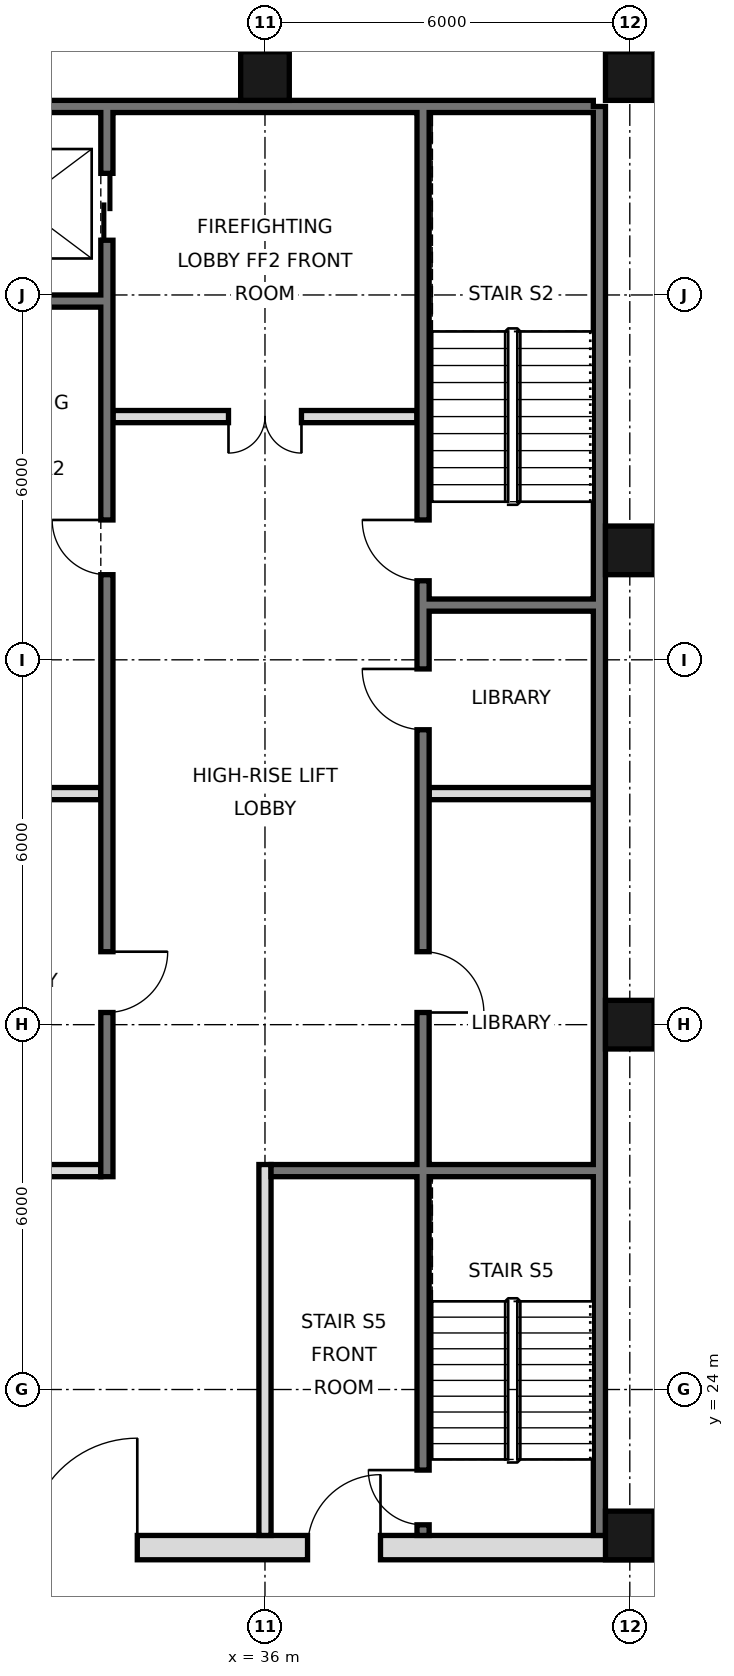
"""IFC4 building model, lengths in metres.
Left out: names, types, materials, properties, quantities, classifications, styles, units other than length and angle.
Written with IfcOpenShell. Run it as: python <this file> out.ifc"""

import sys

from ifc_helpers import new_model, si_unit, direction, frame, frame_2d, origin, origin_2d, place, context, subcontext, project, spatial, rectangle, hollow_rectangle, extrude, element, fill, save


model = new_model("IFC4")
c1 = context("Model", 3, precision=1e-05, world=origin(), true_north=direction((0.0, 1.0)))
c2 = subcontext(c1, "Body", "Model", "MODEL_VIEW")
j1 = project(units=[si_unit("LENGTHUNIT", "METRE"), si_unit("PLANEANGLEUNIT", "RADIAN")], contexts=[c1])
p1 = place(None, origin())
s1 = spatial("IfcSite", under=j1, at=p1, CompositionType="ELEMENT")
p2 = place(p1, origin())
s2 = spatial("IfcBuilding", under=s1, at=p2, CompositionType="ELEMENT")
p3 = place(p2, frame((0.0, 0.0, 151.0)))
s3 = spatial("IfcBuildingStorey", under=s2, at=p3, CompositionType="ELEMENT", Elevation=151.0)
for number, where, z_axis, x_axis in (
    (1, (36.0, 45.6, 0.0), (0.0, 0.0, 1.0), (1.0, 0.0, 0.0)),
    (2, (42.0, 21.6, 0.0), (0.0, 0.0, 1.0), (1.0, 0.0, 0.0)),
    (3, (42.0, 30.0, 0.0), (0.0, 0.0, 1.0), (1.0, 0.0, 0.0)),
    (4, (42.0, 37.8, 0.0), (0.0, 0.0, 1.0), (1.0, 0.0, 0.0)),
    (5, (42.0, 45.6, 0.0), (0.0, 0.0, 1.0), (1.0, 0.0, 0.0)),
):
    element("IfcColumn", number, at=place(p3, frame(where, z_axis=z_axis, x_axis=x_axis)), inside=s3, PredefinedType="COLUMN", context=c2, shape_type="SweptSolid", body=[
        extrude(hollow_rectangle(XDim=0.8, YDim=0.8, WallThickness=0.045, at=origin_2d()), origin(), (0.0, 0.0, 1.0), 3.6),
    ])
p4 = place(p3, frame((41.5, 21.6, 0.0), z_axis=(0.0, 0.0, 1.0), x_axis=(0.0, 1.0, 0.0)))
e6 = element("IfcWall", 6, at=p4, inside=s3, PredefinedType="SOLIDWALL", context=c2, shape_type="SweptSolid", body=[
    extrude(rectangle(XDim=23.5, YDim=0.2, at=frame_2d((11.75, 0.0))), origin(), (0.0, 0.0, 1.0), 3.42),
])
p5 = place(p3, frame((6.6, 45.1, 0.0), z_axis=(0.0, 0.0, 1.0), x_axis=(1.0, 0.0, 0.0)))
e7 = element("IfcWall", 7, at=p5, inside=s3, PredefinedType="SOLIDWALL", context=c2, shape_type="SweptSolid", body=[
    extrude(rectangle(XDim=34.8, YDim=0.2, at=frame_2d((17.4, 0.0))), origin(), (0.0, 0.0, 1.0), 3.42),
])
p6 = place(p3, frame((5.6, 21.4, 0.0), z_axis=(0.0, 0.0, 1.0), x_axis=(1.0, 0.0, 0.0)))
e8 = element("IfcWall", 8, at=p6, inside=s3, PredefinedType="SOLIDWALL", context=c2, shape_type="SweptSolid", body=[
    extrude(rectangle(XDim=36.8, YDim=0.4, at=frame_2d((18.4, 0.0))), origin(), (0.0, 0.0, 1.0), 3.42),
])
p7 = place(p6, frame((8.5, 0.0, 0.0)))
e9 = element("IfcOpeningElement", 9, at=p7, cuts=e8, PredefinedType="OPENING", context=c2, shape_type="SweptSolid", body=[
    extrude(rectangle(XDim=1.8, YDim=2.1, at=frame_2d((0.9, 1.05))), frame((0.0, 0.21, 0.0), z_axis=(0.0, -1.0, 0.0), x_axis=(1.0, 0.0, 0.0)), (0.0, 0.0, 1.0), 0.42),
])
p8 = place(p6, frame((17.5, 0.0, 0.0)))
e10 = element("IfcOpeningElement", 10, at=p8, cuts=e8, PredefinedType="OPENING", context=c2, shape_type="SweptSolid", body=[
    extrude(rectangle(XDim=1.8, YDim=2.1, at=frame_2d((0.9, 1.05))), frame((0.0, 0.21, 0.0), z_axis=(0.0, -1.0, 0.0), x_axis=(1.0, 0.0, 0.0)), (0.0, 0.0, 1.0), 0.42),
])
p9 = place(p6, frame((26.5, 0.0, 0.0)))
e11 = element("IfcOpeningElement", 11, at=p9, cuts=e8, PredefinedType="OPENING", context=c2, shape_type="SweptSolid", body=[
    extrude(rectangle(XDim=1.8, YDim=2.1, at=frame_2d((0.9, 1.05))), frame((0.0, 0.21, 0.0), z_axis=(0.0, -1.0, 0.0), x_axis=(1.0, 0.0, 0.0)), (0.0, 0.0, 1.0), 0.42),
])
p10 = place(p6, frame((4.5, 0.0, 0.0)))
e12 = element("IfcOpeningElement", 12, at=p10, cuts=e8, PredefinedType="OPENING", context=c2, shape_type="SweptSolid", body=[
    extrude(rectangle(XDim=1.2, YDim=2.1, at=frame_2d((0.6, 1.05))), frame((0.0, 0.21, 0.0), z_axis=(0.0, -1.0, 0.0), x_axis=(1.0, 0.0, 0.0)), (0.0, 0.0, 1.0), 0.42),
])
p11 = place(p6, frame((31.1, 0.0, 0.0)))
e13 = element("IfcOpeningElement", 13, at=p11, cuts=e8, PredefinedType="OPENING", context=c2, shape_type="SweptSolid", body=[
    extrude(rectangle(XDim=1.2, YDim=2.1, at=frame_2d((0.6, 1.05))), frame((0.0, 0.21, 0.0), z_axis=(0.0, -1.0, 0.0), x_axis=(1.0, 0.0, 0.0)), (0.0, 0.0, 1.0), 0.42),
])
p12 = place(p3, frame((33.4, 27.5, 0.0), z_axis=(0.0, 0.0, 1.0), x_axis=(0.0, 1.0, 0.0)))
e14 = element("IfcWall", 14, at=p12, inside=s3, PredefinedType="SOLIDWALL", context=c2, shape_type="SweptSolid", body=[
    extrude(rectangle(XDim=17.5, YDim=0.2, at=frame_2d((8.75, 0.0))), origin(), (0.0, 0.0, 1.0), 3.42),
])
p13 = place(p12, frame((15.4, 0.0, 0.0)))
e15 = element("IfcOpeningElement", 15, at=p13, cuts=e14, PredefinedType="OPENING", context=c2, shape_type="SweptSolid", body=[
    extrude(rectangle(XDim=1.1, YDim=2.1, at=frame_2d((0.55, 1.05))), frame((0.0, 0.11, 0.0), z_axis=(0.0, -1.0, 0.0), x_axis=(1.0, 0.0, 0.0)), (0.0, 0.0, 1.0), 0.22),
])
p14 = place(p12, frame((2.7, 0.0, 0.0)))
e16 = element("IfcOpeningElement", 16, at=p14, cuts=e14, PredefinedType="OPENING", context=c2, shape_type="SweptSolid", body=[
    extrude(rectangle(XDim=1.0, YDim=2.1, at=frame_2d((0.5, 1.05))), frame((0.0, 0.11, 0.0), z_axis=(0.0, -1.0, 0.0), x_axis=(1.0, 0.0, 0.0)), (0.0, 0.0, 1.0), 0.22),
])
p15 = place(p12, frame((9.9, 0.0, 0.0)))
e17 = element("IfcOpeningElement", 17, at=p15, cuts=e14, PredefinedType="OPENING", context=c2, shape_type="SweptSolid", body=[
    extrude(rectangle(XDim=0.9, YDim=2.1, at=frame_2d((0.45, 1.05))), frame((0.0, 0.11, 0.0), z_axis=(0.0, -1.0, 0.0), x_axis=(1.0, 0.0, 0.0)), (0.0, 0.0, 1.0), 0.22),
])
p16 = place(p3, frame((36.0, 21.6, 0.0), z_axis=(0.0, 0.0, 1.0), x_axis=(0.0, 1.0, 0.0)))
e18 = element("IfcWall", 18, at=p16, inside=s3, PredefinedType="PARTITIONING", context=c2, shape_type="SweptSolid", body=[
    extrude(rectangle(XDim=6.1, YDim=0.2, at=frame_2d((3.05, 0.0))), origin(), (0.0, 0.0, 1.0), 3.42),
])
p17 = place(p3, frame((38.6, 21.6, 0.0), z_axis=(0.0, 0.0, 1.0), x_axis=(0.0, 1.0, 0.0)))
e19 = element("IfcWall", 19, at=p17, inside=s3, PredefinedType="SOLIDWALL", context=c2, shape_type="SweptSolid", body=[
    extrude(rectangle(XDim=23.4, YDim=0.2, at=frame_2d((11.7, 0.0))), origin(), (0.0, 0.0, 1.0), 3.42),
])
p18 = place(p17, frame((8.6, 0.0, 0.0)))
e20 = element("IfcOpeningElement", 20, at=p18, cuts=e19, PredefinedType="OPENING", context=c2, shape_type="SweptSolid", body=[
    extrude(rectangle(XDim=1.0, YDim=2.1, at=frame_2d((0.5, 1.05))), frame((0.0, 0.11, 0.0), z_axis=(0.0, -1.0, 0.0), x_axis=(1.0, 0.0, 0.0)), (0.0, 0.0, 1.0), 0.22),
])
p19 = place(p17, frame((13.25, 0.0, 0.0)))
e21 = element("IfcOpeningElement", 21, at=p19, cuts=e19, PredefinedType="OPENING", context=c2, shape_type="SweptSolid", body=[
    extrude(rectangle(XDim=1.0, YDim=2.1, at=frame_2d((0.5, 1.05))), frame((0.0, 0.11, 0.0), z_axis=(0.0, -1.0, 0.0), x_axis=(1.0, 0.0, 0.0)), (0.0, 0.0, 1.0), 0.22),
])
p20 = place(p17, frame((15.7, 0.0, 0.0)))
e22 = element("IfcOpeningElement", 22, at=p20, cuts=e19, PredefinedType="OPENING", context=c2, shape_type="SweptSolid", body=[
    extrude(rectangle(XDim=1.0, YDim=2.1, at=frame_2d((0.5, 1.05))), frame((0.0, 0.11, 0.0), z_axis=(0.0, -1.0, 0.0), x_axis=(1.0, 0.0, 0.0)), (0.0, 0.0, 1.0), 0.22),
])
p21 = place(p17, frame((0.175, 0.0, 0.0)))
e23 = element("IfcOpeningElement", 23, at=p21, cuts=e19, PredefinedType="OPENING", context=c2, shape_type="SweptSolid", body=[
    extrude(rectangle(XDim=0.9, YDim=2.1, at=frame_2d((0.45, 1.05))), frame((0.0, 0.11, 0.0), z_axis=(0.0, -1.0, 0.0), x_axis=(1.0, 0.0, 0.0)), (0.0, 0.0, 1.0), 0.22),
])
p22 = place(p3, frame((30.6, 27.6, 0.0), z_axis=(0.0, 0.0, 1.0), x_axis=(1.0, 0.0, 0.0)))
e24 = element("IfcWall", 24, at=p22, inside=s3, PredefinedType="PARTITIONING", context=c2, shape_type="SweptSolid", body=[
    extrude(rectangle(XDim=2.7, YDim=0.2, at=frame_2d((1.35, 0.0))), origin(), (0.0, 0.0, 1.0), 3.42),
])
p23 = place(p3, frame((36.1, 27.6, 0.0), z_axis=(0.0, 0.0, 1.0), x_axis=(1.0, 0.0, 0.0)))
e25 = element("IfcWall", 25, at=p23, inside=s3, PredefinedType="SOLIDWALL", context=c2, shape_type="SweptSolid", body=[
    extrude(rectangle(XDim=5.3, YDim=0.2, at=frame_2d((2.65, 0.0))), origin(), (0.0, 0.0, 1.0), 3.42),
])
p24 = place(p3, frame((30.6, 33.8, 0.0), z_axis=(0.0, 0.0, 1.0), x_axis=(1.0, 0.0, 0.0)))
e26 = element("IfcWall", 26, at=p24, inside=s3, PredefinedType="SOLIDWALL", context=c2, shape_type="SweptSolid", body=[
    extrude(rectangle(XDim=2.7, YDim=0.2, at=frame_2d((1.35, 0.0))), origin(), (0.0, 0.0, 1.0), 3.42),
])
p25 = place(p3, frame((38.7, 33.8, 0.0), z_axis=(0.0, 0.0, 1.0), x_axis=(1.0, 0.0, 0.0)))
e27 = element("IfcWall", 27, at=p25, inside=s3, PredefinedType="PARTITIONING", context=c2, shape_type="SweptSolid", body=[
    extrude(rectangle(XDim=2.7, YDim=0.2, at=frame_2d((1.35, 0.0))), origin(), (0.0, 0.0, 1.0), 3.42),
])
p26 = place(p3, frame((38.7, 36.9, 0.0), z_axis=(0.0, 0.0, 1.0), x_axis=(1.0, 0.0, 0.0)))
e28 = element("IfcWall", 28, at=p26, inside=s3, PredefinedType="SOLIDWALL", context=c2, shape_type="SweptSolid", body=[
    extrude(rectangle(XDim=2.7, YDim=0.2, at=frame_2d((1.35, 0.0))), origin(), (0.0, 0.0, 1.0), 3.42),
])
p27 = place(p3, frame((33.5, 40.0, 0.0), z_axis=(0.0, 0.0, 1.0), x_axis=(1.0, 0.0, 0.0)))
e29 = element("IfcWall", 29, at=p27, inside=s3, PredefinedType="PARTITIONING", context=c2, shape_type="SweptSolid", body=[
    extrude(rectangle(XDim=5.0, YDim=0.2, at=frame_2d((2.5, 0.0))), origin(), (0.0, 0.0, 1.0), 3.42),
])
p28 = place(p27, frame((1.9, 0.0, 0.0)))
e30 = element("IfcOpeningElement", 30, at=p28, cuts=e29, PredefinedType="OPENING", context=c2, shape_type="SweptSolid", body=[
    extrude(rectangle(XDim=1.2, YDim=2.1, at=frame_2d((0.6, 1.05))), frame((0.0, 0.11, 0.0), z_axis=(0.0, -1.0, 0.0), x_axis=(1.0, 0.0, 0.0)), (0.0, 0.0, 1.0), 0.22),
])
p29 = place(p3, frame((30.6, 41.9, 0.0), z_axis=(0.0, 0.0, 1.0), x_axis=(1.0, 0.0, 0.0)))
e31 = element("IfcWall", 31, at=p29, inside=s3, PredefinedType="SOLIDWALL", context=c2, shape_type="SweptSolid", body=[
    extrude(rectangle(XDim=2.7, YDim=0.2, at=frame_2d((1.35, 0.0))), origin(), (0.0, 0.0, 1.0), 3.42),
])
p30 = place(p9, frame((1.8, 0.0, 0.0), z_axis=(0.0, 0.0, 1.0), x_axis=(-1.0, 0.0, 0.0)))
e32 = element("IfcDoor", 32, at=p30, inside=s3, OperationType="SINGLE_SWING_LEFT", PredefinedType="DOOR", context=c2, shape_type="SweptSolid", body=[
    extrude(rectangle(XDim=1.8, YDim=2.1, at=frame_2d((0.9, 1.05))), frame((0.0, 0.025, 0.0), z_axis=(0.0, -1.0, 0.0), x_axis=(1.0, 0.0, 0.0)), (0.0, 0.0, 1.0), 0.05),
])
fill(e11, e32)
p31 = place(p11, frame((1.2, 0.0, 0.0), z_axis=(0.0, 0.0, 1.0), x_axis=(-1.0, 0.0, 0.0)))
e33 = element("IfcDoor", 33, at=p31, inside=s3, OperationType="SINGLE_SWING_LEFT", PredefinedType="DOOR", context=c2, shape_type="SweptSolid", body=[
    extrude(rectangle(XDim=1.2, YDim=2.1, at=frame_2d((0.6, 1.05))), frame((0.0, 0.025, 0.0), z_axis=(0.0, -1.0, 0.0), x_axis=(1.0, 0.0, 0.0)), (0.0, 0.0, 1.0), 0.05),
])
fill(e13, e33)
p32 = place(p28, frame((1.2, 0.0, 0.0), z_axis=(0.0, 0.0, 1.0), x_axis=(-1.0, 0.0, 0.0)))
e34 = element("IfcDoor", 34, at=p32, inside=s3, OperationType="DOUBLE_DOOR_SINGLE_SWING", PredefinedType="DOOR", context=c2, shape_type="SweptSolid", body=[
    extrude(rectangle(XDim=1.2, YDim=2.1, at=frame_2d((0.6, 1.05))), frame((0.0, 0.025, 0.0), z_axis=(0.0, -1.0, 0.0), x_axis=(1.0, 0.0, 0.0)), (0.0, 0.0, 1.0), 0.05),
])
fill(e30, e34)
p33 = place(p13, origin())
e35 = element("IfcDoor", 35, at=p33, inside=s3, OperationType="DOUBLE_DOOR_SLIDING", PredefinedType="DOOR", context=c2, shape_type="SweptSolid", body=[
    extrude(rectangle(XDim=1.1, YDim=2.1, at=frame_2d((0.55, 1.05))), frame((0.0, 0.025, 0.0), z_axis=(0.0, -1.0, 0.0), x_axis=(1.0, 0.0, 0.0)), (0.0, 0.0, 1.0), 0.05),
])
fill(e15, e35)
p34 = place(p18, frame((1.0, 0.0, 0.0), z_axis=(0.0, 0.0, 1.0), x_axis=(-1.0, 0.0, 0.0)))
e36 = element("IfcDoor", 36, at=p34, inside=s3, OperationType="SINGLE_SWING_RIGHT", PredefinedType="DOOR", context=c2, shape_type="SweptSolid", body=[
    extrude(rectangle(XDim=1.0, YDim=2.1, at=frame_2d((0.5, 1.05))), frame((0.0, 0.025, 0.0), z_axis=(0.0, -1.0, 0.0), x_axis=(1.0, 0.0, 0.0)), (0.0, 0.0, 1.0), 0.05),
])
fill(e20, e36)
p35 = place(p19, frame((1.0, 0.0, 0.0), z_axis=(0.0, 0.0, 1.0), x_axis=(-1.0, 0.0, 0.0)))
e37 = element("IfcDoor", 37, at=p35, inside=s3, OperationType="SINGLE_SWING_LEFT", PredefinedType="DOOR", context=c2, shape_type="SweptSolid", body=[
    extrude(rectangle(XDim=1.0, YDim=2.1, at=frame_2d((0.5, 1.05))), frame((0.0, 0.025, 0.0), z_axis=(0.0, -1.0, 0.0), x_axis=(1.0, 0.0, 0.0)), (0.0, 0.0, 1.0), 0.05),
])
fill(e21, e37)
p36 = place(p14, origin())
e38 = element("IfcDoor", 38, at=p36, inside=s3, OperationType="SINGLE_SWING_RIGHT", PredefinedType="DOOR", context=c2, shape_type="SweptSolid", body=[
    extrude(rectangle(XDim=1.0, YDim=2.1, at=frame_2d((0.5, 1.05))), frame((0.0, 0.025, 0.0), z_axis=(0.0, -1.0, 0.0), x_axis=(1.0, 0.0, 0.0)), (0.0, 0.0, 1.0), 0.05),
])
fill(e16, e38)
p37 = place(p20, frame((1.0, 0.0, 0.0), z_axis=(0.0, 0.0, 1.0), x_axis=(-1.0, 0.0, 0.0)))
e39 = element("IfcDoor", 39, at=p37, inside=s3, OperationType="SINGLE_SWING_LEFT", PredefinedType="DOOR", context=c2, shape_type="SweptSolid", body=[
    extrude(rectangle(XDim=1.0, YDim=2.1, at=frame_2d((0.5, 1.05))), frame((0.0, 0.025, 0.0), z_axis=(0.0, -1.0, 0.0), x_axis=(1.0, 0.0, 0.0)), (0.0, 0.0, 1.0), 0.05),
])
fill(e22, e39)
p38 = place(p21, frame((0.9, 0.0, 0.0), z_axis=(0.0, 0.0, 1.0), x_axis=(-1.0, 0.0, 0.0)))
e40 = element("IfcDoor", 40, at=p38, inside=s3, OperationType="SINGLE_SWING_LEFT", PredefinedType="DOOR", context=c2, shape_type="SweptSolid", body=[
    extrude(rectangle(XDim=0.9, YDim=2.1, at=frame_2d((0.45, 1.05))), frame((0.0, 0.025, 0.0), z_axis=(0.0, -1.0, 0.0), x_axis=(1.0, 0.0, 0.0)), (0.0, 0.0, 1.0), 0.05),
])
fill(e23, e40)
p39 = place(p15, frame((0.9, 0.0, 0.0), z_axis=(0.0, 0.0, 1.0), x_axis=(-1.0, 0.0, 0.0)))
e41 = element("IfcDoor", 41, at=p39, inside=s3, OperationType="SINGLE_SWING_LEFT", PredefinedType="DOOR", context=c2, shape_type="SweptSolid", body=[
    extrude(rectangle(XDim=0.9, YDim=2.1, at=frame_2d((0.45, 1.05))), frame((0.0, 0.025, 0.0), z_axis=(0.0, -1.0, 0.0), x_axis=(1.0, 0.0, 0.0)), (0.0, 0.0, 1.0), 0.05),
])
fill(e17, e41)
save(model, sys.argv[1])
